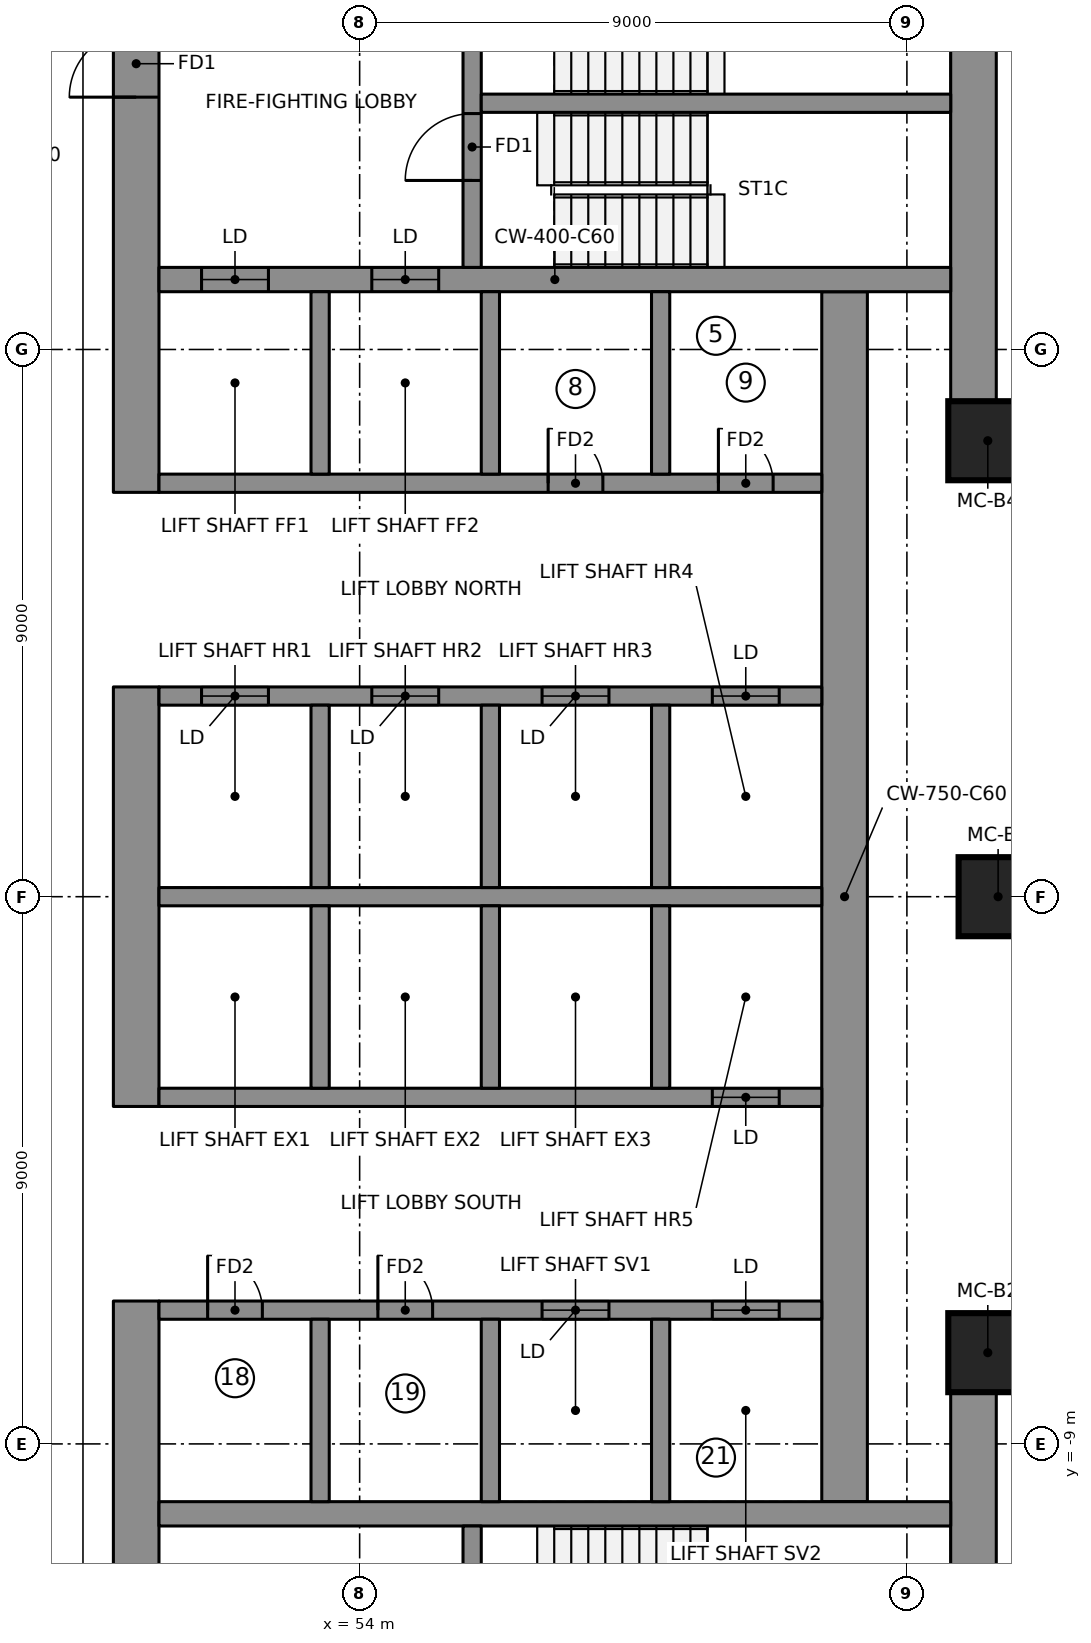
"""IFC4 building model, lengths in metres.
Left out: names, types, materials, properties, quantities, classifications, styles, units other than length and angle.
Written with IfcOpenShell. Run it as: python <this file> out.ifc"""

import sys

from ifc_helpers import new_model, si_unit, direction, frame, frame_2d, origin, origin_2d, place, context, subcontext, project, spatial, rectangle, extrude, element, fill, save


model = new_model("IFC4")
c1 = context("Model", 3, precision=1e-05, world=origin(), true_north=direction((0.0, 1.0)))
c2 = subcontext(c1, "Body", "Model", "MODEL_VIEW")
j1 = project(units=[si_unit("LENGTHUNIT", "METRE"), si_unit("PLANEANGLEUNIT", "RADIAN")], contexts=[c1])
p1 = place(None, origin())
s1 = spatial("IfcSite", under=j1, at=p1, CompositionType="ELEMENT")
p2 = place(p1, origin())
s2 = spatial("IfcBuilding", under=s1, at=p2, CompositionType="ELEMENT")
p3 = place(p2, frame((0.0, 0.0, 193.25)))
s3 = spatial("IfcBuildingStorey", under=s2, at=p3, CompositionType="ELEMENT", Elevation=193.25)
p4 = place(p3, frame((50.325, 6.65, 0.0), z_axis=(0.0, 0.0, 1.0), x_axis=(0.0, 1.0, 0.0)))
e1 = element("IfcWall", 1, at=p4, inside=s3, PredefinedType="SHEAR", context=c2, shape_type="SweptSolid", body=[
    extrude(rectangle(XDim=9.85, YDim=0.75, at=frame_2d((4.925, 0.0))), origin(), (0.0, 0.0, 1.0), 3.55),
])
p5 = place(p4, frame((6.5, 0.0, 0.0)))
e2 = element("IfcOpeningElement", 2, at=p5, cuts=e1, PredefinedType="OPENING", context=c2, shape_type="SweptSolid", body=[
    extrude(rectangle(XDim=1.1, YDim=2.1, at=frame_2d((0.55, 1.05))), frame((0.0, 0.385, 0.0), z_axis=(0.0, -1.0, 0.0), x_axis=(1.0, 0.0, 0.0)), (0.0, 0.0, 1.0), 0.77),
])
p6 = place(p3, frame((50.325, -3.45, 0.0), z_axis=(0.0, 0.0, 1.0), x_axis=(0.0, 1.0, 0.0)))
e3 = element("IfcWall", 3, at=p6, inside=s3, PredefinedType="SHEAR", context=c2, shape_type="SweptSolid", body=[
    extrude(rectangle(XDim=6.9, YDim=0.75, at=frame_2d((3.45, 0.0))), origin(), (0.0, 0.0, 1.0), 3.55),
])
p7 = place(p3, frame((50.325, -16.5, 0.0), z_axis=(0.0, 0.0, 1.0), x_axis=(0.0, 1.0, 0.0)))
e4 = element("IfcWall", 4, at=p7, inside=s3, PredefinedType="SHEAR", context=c2, shape_type="SweptSolid", body=[
    extrude(rectangle(XDim=9.85, YDim=0.75, at=frame_2d((4.925, 0.0))), origin(), (0.0, 0.0, 1.0), 3.55),
])
p8 = place(p7, frame((2.25, 0.0, 0.0)))
e5 = element("IfcOpeningElement", 5, at=p8, cuts=e4, PredefinedType="OPENING", context=c2, shape_type="SweptSolid", body=[
    extrude(rectangle(XDim=1.1, YDim=2.1, at=frame_2d((0.55, 1.05))), frame((0.0, 0.385, 0.0), z_axis=(0.0, -1.0, 0.0), x_axis=(1.0, 0.0, 0.0)), (0.0, 0.0, 1.0), 0.77),
])
for number, where, z_axis, x_axis in (
    (6, (64.095, 8.099, 0.0), (0.0, 0.0, 1.0), (0.0, 1.0, 0.0)),
    (7, (64.095, -15.75, 0.0), (0.0, 0.0, 1.0), (0.0, 1.0, 0.0)),
):
    element("IfcWall", number, at=place(p3, frame(where, z_axis=z_axis, x_axis=x_axis)), inside=s3, PredefinedType="SHEAR", context=c2, shape_type="SweptSolid", body=[
        extrude(rectangle(XDim=7.651, YDim=0.75, at=frame_2d((3.825, 0.0))), origin(), (0.0, 0.0, 1.0), 3.55),
    ])
p9 = place(p3, frame((61.975, -9.95, 0.0), z_axis=(0.0, 0.0, 1.0), x_axis=(0.0, 1.0, 0.0)))
e8 = element("IfcWall", 8, at=p9, inside=s3, PredefinedType="SHEAR", context=c2, shape_type="SweptSolid", body=[
    extrude(rectangle(XDim=19.9, YDim=0.75, at=frame_2d((9.95, 0.0))), origin(), (0.0, 0.0, 1.0), 3.55),
])
p10 = place(p3, frame((50.7, 10.15, 0.0), z_axis=(0.0, 0.0, 1.0), x_axis=(1.0, 0.0, 0.0)))
e9 = element("IfcWall", 9, at=p10, inside=s3, PredefinedType="SHEAR", context=c2, shape_type="SweptSolid", body=[
    extrude(rectangle(XDim=13.02, YDim=0.4, at=frame_2d((6.51, 0.0))), origin(), (0.0, 0.0, 1.0), 3.55),
])
p11 = place(p10, frame((0.7, 0.0, 0.0)))
e10 = element("IfcOpeningElement", 10, at=p11, cuts=e9, PredefinedType="OPENING", context=c2, shape_type="SweptSolid", body=[
    extrude(rectangle(XDim=1.1, YDim=2.1, at=frame_2d((0.55, 1.05))), frame((0.0, 0.21, 0.0), z_axis=(0.0, -1.0, 0.0), x_axis=(1.0, 0.0, 0.0)), (0.0, 0.0, 1.0), 0.42),
])
p12 = place(p10, frame((3.5, 0.0, 0.0)))
e11 = element("IfcOpeningElement", 11, at=p12, cuts=e9, PredefinedType="OPENING", context=c2, shape_type="SweptSolid", body=[
    extrude(rectangle(XDim=1.1, YDim=2.1, at=frame_2d((0.55, 1.05))), frame((0.0, 0.21, 0.0), z_axis=(0.0, -1.0, 0.0), x_axis=(1.0, 0.0, 0.0)), (0.0, 0.0, 1.0), 0.42),
])
p13 = place(p3, frame((50.7, -10.15, 0.0), z_axis=(0.0, 0.0, 1.0), x_axis=(1.0, 0.0, 0.0)))
e12 = element("IfcWall", 12, at=p13, inside=s3, PredefinedType="SHEAR", context=c2, shape_type="SweptSolid", body=[
    extrude(rectangle(XDim=13.02, YDim=0.4, at=frame_2d((6.51, 0.0))), origin(), (0.0, 0.0, 1.0), 3.55),
])
p14 = place(p3, frame((50.7, 0.0, 0.0), z_axis=(0.0, 0.0, 1.0), x_axis=(1.0, 0.0, 0.0)))
e13 = element("IfcWall", 13, at=p14, inside=s3, PredefinedType="SHEAR", context=c2, shape_type="SweptSolid", body=[
    extrude(rectangle(XDim=10.9, YDim=0.3, at=frame_2d((5.45, 0.0))), origin(), (0.0, 0.0, 1.0), 3.55),
])
p15 = place(p3, frame((50.7, 3.3, 0.0), z_axis=(0.0, 0.0, 1.0), x_axis=(1.0, 0.0, 0.0)))
e14 = element("IfcWall", 14, at=p15, inside=s3, PredefinedType="SHEAR", context=c2, shape_type="SweptSolid", body=[
    extrude(rectangle(XDim=10.9, YDim=0.3, at=frame_2d((5.45, 0.0))), origin(), (0.0, 0.0, 1.0), 3.55),
])
p16 = place(p15, frame((0.7, 0.0, 0.0)))
e15 = element("IfcOpeningElement", 15, at=p16, cuts=e14, PredefinedType="OPENING", context=c2, shape_type="SweptSolid", body=[
    extrude(rectangle(XDim=1.1, YDim=2.1, at=frame_2d((0.55, 1.05))), frame((0.0, 0.16, 0.0), z_axis=(0.0, -1.0, 0.0), x_axis=(1.0, 0.0, 0.0)), (0.0, 0.0, 1.0), 0.32),
])
p17 = place(p15, frame((3.5, 0.0, 0.0)))
e16 = element("IfcOpeningElement", 16, at=p17, cuts=e14, PredefinedType="OPENING", context=c2, shape_type="SweptSolid", body=[
    extrude(rectangle(XDim=1.1, YDim=2.1, at=frame_2d((0.55, 1.05))), frame((0.0, 0.16, 0.0), z_axis=(0.0, -1.0, 0.0), x_axis=(1.0, 0.0, 0.0)), (0.0, 0.0, 1.0), 0.32),
])
p18 = place(p15, frame((6.3, 0.0, 0.0)))
e17 = element("IfcOpeningElement", 17, at=p18, cuts=e14, PredefinedType="OPENING", context=c2, shape_type="SweptSolid", body=[
    extrude(rectangle(XDim=1.1, YDim=2.1, at=frame_2d((0.55, 1.05))), frame((0.0, 0.16, 0.0), z_axis=(0.0, -1.0, 0.0), x_axis=(1.0, 0.0, 0.0)), (0.0, 0.0, 1.0), 0.32),
])
p19 = place(p15, frame((9.1, 0.0, 0.0)))
e18 = element("IfcOpeningElement", 18, at=p19, cuts=e14, PredefinedType="OPENING", context=c2, shape_type="SweptSolid", body=[
    extrude(rectangle(XDim=1.1, YDim=2.1, at=frame_2d((0.55, 1.05))), frame((0.0, 0.16, 0.0), z_axis=(0.0, -1.0, 0.0), x_axis=(1.0, 0.0, 0.0)), (0.0, 0.0, 1.0), 0.32),
])
p20 = place(p3, frame((50.7, 6.8, 0.0), z_axis=(0.0, 0.0, 1.0), x_axis=(1.0, 0.0, 0.0)))
e19 = element("IfcWall", 19, at=p20, inside=s3, PredefinedType="SHEAR", context=c2, shape_type="SweptSolid", body=[
    extrude(rectangle(XDim=10.9, YDim=0.3, at=frame_2d((5.45, 0.0))), origin(), (0.0, 0.0, 1.0), 3.55),
])
p21 = place(p20, frame((6.4, 0.0, 0.0)))
e20 = element("IfcOpeningElement", 20, at=p21, cuts=e19, PredefinedType="OPENING", context=c2, shape_type="SweptSolid", body=[
    extrude(rectangle(XDim=0.9, YDim=2.1, at=frame_2d((0.45, 1.05))), frame((0.0, 0.16, 0.0), z_axis=(0.0, -1.0, 0.0), x_axis=(1.0, 0.0, 0.0)), (0.0, 0.0, 1.0), 0.32),
])
p22 = place(p20, frame((9.2, 0.0, 0.0)))
e21 = element("IfcOpeningElement", 21, at=p22, cuts=e19, PredefinedType="OPENING", context=c2, shape_type="SweptSolid", body=[
    extrude(rectangle(XDim=0.9, YDim=2.1, at=frame_2d((0.45, 1.05))), frame((0.0, 0.16, 0.0), z_axis=(0.0, -1.0, 0.0), x_axis=(1.0, 0.0, 0.0)), (0.0, 0.0, 1.0), 0.32),
])
for number, where, z_axis, x_axis in (
    (22, (53.35, 0.15, 0.0), (0.0, 0.0, 1.0), (0.0, 1.0, 0.0)),
    (23, (53.35, 6.95, 0.0), (0.0, 0.0, 1.0), (0.0, 1.0, 0.0)),
    (24, (56.15, 0.15, 0.0), (0.0, 0.0, 1.0), (0.0, 1.0, 0.0)),
    (25, (56.15, 6.95, 0.0), (0.0, 0.0, 1.0), (0.0, 1.0, 0.0)),
    (26, (58.95, 0.15, 0.0), (0.0, 0.0, 1.0), (0.0, 1.0, 0.0)),
    (27, (58.95, 6.95, 0.0), (0.0, 0.0, 1.0), (0.0, 1.0, 0.0)),
):
    element("IfcWall", number, at=place(p3, frame(where, z_axis=z_axis, x_axis=x_axis)), inside=s3, PredefinedType="SHEAR", context=c2, shape_type="SweptSolid", body=[
        extrude(rectangle(XDim=3.0, YDim=0.3, at=frame_2d((1.5, 0.0))), origin(), (0.0, 0.0, 1.0), 3.55),
    ])
p23 = place(p3, frame((50.7, -3.3, 0.0), z_axis=(0.0, 0.0, 1.0), x_axis=(1.0, 0.0, 0.0)))
e28 = element("IfcWall", 28, at=p23, inside=s3, PredefinedType="SHEAR", context=c2, shape_type="SweptSolid", body=[
    extrude(rectangle(XDim=10.9, YDim=0.3, at=frame_2d((5.45, 0.0))), origin(), (0.0, 0.0, 1.0), 3.55),
])
p24 = place(p23, frame((9.1, 0.0, 0.0)))
e29 = element("IfcOpeningElement", 29, at=p24, cuts=e28, PredefinedType="OPENING", context=c2, shape_type="SweptSolid", body=[
    extrude(rectangle(XDim=1.1, YDim=2.1, at=frame_2d((0.55, 1.05))), frame((0.0, 0.16, 0.0), z_axis=(0.0, -1.0, 0.0), x_axis=(1.0, 0.0, 0.0)), (0.0, 0.0, 1.0), 0.32),
])
p25 = place(p3, frame((50.7, -6.8, 0.0), z_axis=(0.0, 0.0, 1.0), x_axis=(1.0, 0.0, 0.0)))
e30 = element("IfcWall", 30, at=p25, inside=s3, PredefinedType="SHEAR", context=c2, shape_type="SweptSolid", body=[
    extrude(rectangle(XDim=10.9, YDim=0.3, at=frame_2d((5.45, 0.0))), origin(), (0.0, 0.0, 1.0), 3.55),
])
p26 = place(p25, frame((6.3, 0.0, 0.0)))
e31 = element("IfcOpeningElement", 31, at=p26, cuts=e30, PredefinedType="OPENING", context=c2, shape_type="SweptSolid", body=[
    extrude(rectangle(XDim=1.1, YDim=2.1, at=frame_2d((0.55, 1.05))), frame((0.0, 0.16, 0.0), z_axis=(0.0, -1.0, 0.0), x_axis=(1.0, 0.0, 0.0)), (0.0, 0.0, 1.0), 0.32),
])
p27 = place(p25, frame((9.1, 0.0, 0.0)))
e32 = element("IfcOpeningElement", 32, at=p27, cuts=e30, PredefinedType="OPENING", context=c2, shape_type="SweptSolid", body=[
    extrude(rectangle(XDim=1.1, YDim=2.1, at=frame_2d((0.55, 1.05))), frame((0.0, 0.16, 0.0), z_axis=(0.0, -1.0, 0.0), x_axis=(1.0, 0.0, 0.0)), (0.0, 0.0, 1.0), 0.32),
])
p28 = place(p25, frame((0.8, 0.0, 0.0)))
e33 = element("IfcOpeningElement", 33, at=p28, cuts=e30, PredefinedType="OPENING", context=c2, shape_type="SweptSolid", body=[
    extrude(rectangle(XDim=0.9, YDim=2.1, at=frame_2d((0.45, 1.05))), frame((0.0, 0.16, 0.0), z_axis=(0.0, -1.0, 0.0), x_axis=(1.0, 0.0, 0.0)), (0.0, 0.0, 1.0), 0.32),
])
p29 = place(p25, frame((3.6, 0.0, 0.0)))
e34 = element("IfcOpeningElement", 34, at=p29, cuts=e30, PredefinedType="OPENING", context=c2, shape_type="SweptSolid", body=[
    extrude(rectangle(XDim=0.9, YDim=2.1, at=frame_2d((0.45, 1.05))), frame((0.0, 0.16, 0.0), z_axis=(0.0, -1.0, 0.0), x_axis=(1.0, 0.0, 0.0)), (0.0, 0.0, 1.0), 0.32),
])
for number, where, z_axis, x_axis in (
    (35, (53.35, -3.15, 0.0), (0.0, 0.0, 1.0), (0.0, 1.0, 0.0)),
    (36, (53.35, -9.95, 0.0), (0.0, 0.0, 1.0), (0.0, 1.0, 0.0)),
    (37, (56.15, -3.15, 0.0), (0.0, 0.0, 1.0), (0.0, 1.0, 0.0)),
    (38, (56.15, -9.95, 0.0), (0.0, 0.0, 1.0), (0.0, 1.0, 0.0)),
    (39, (58.95, -3.15, 0.0), (0.0, 0.0, 1.0), (0.0, 1.0, 0.0)),
    (40, (58.95, -9.95, 0.0), (0.0, 0.0, 1.0), (0.0, 1.0, 0.0)),
):
    element("IfcWall", number, at=place(p3, frame(where, z_axis=z_axis, x_axis=x_axis)), inside=s3, PredefinedType="SHEAR", context=c2, shape_type="SweptSolid", body=[
        extrude(rectangle(XDim=3.0, YDim=0.3, at=frame_2d((1.5, 0.0))), origin(), (0.0, 0.0, 1.0), 3.55),
    ])
p30 = place(p3, frame((55.85, 10.35, 0.0), z_axis=(0.0, 0.0, 1.0), x_axis=(0.0, 1.0, 0.0)))
e41 = element("IfcWall", 41, at=p30, inside=s3, PredefinedType="SHEAR", context=c2, shape_type="SweptSolid", body=[
    extrude(rectangle(XDim=5.4, YDim=0.3, at=frame_2d((2.7, 0.0))), origin(), (0.0, 0.0, 1.0), 3.55),
])
p31 = place(p30, frame((1.43, 0.0, 0.0)))
e42 = element("IfcOpeningElement", 42, at=p31, cuts=e41, PredefinedType="OPENING", context=c2, shape_type="SweptSolid", body=[
    extrude(rectangle(XDim=1.1, YDim=2.1, at=frame_2d((0.55, 1.05))), frame((0.0, 0.16, 0.0), z_axis=(0.0, -1.0, 0.0), x_axis=(1.0, 0.0, 0.0)), (0.0, 0.0, 1.0), 0.32),
])
p32 = place(p30, frame((3.6, 0.0, 0.0)))
e43 = element("IfcOpeningElement", 43, at=p32, cuts=e41, PredefinedType="OPENING", context=c2, shape_type="SweptSolid", body=[
    extrude(rectangle(XDim=1.1, YDim=2.1, at=frame_2d((0.55, 1.05))), frame((0.0, 0.16, 0.0), z_axis=(0.0, -1.0, 0.0), x_axis=(1.0, 0.0, 0.0)), (0.0, 0.0, 1.0), 0.32),
])
p33 = place(p3, frame((55.85, -15.75, 0.0), z_axis=(0.0, 0.0, 1.0), x_axis=(0.0, 1.0, 0.0)))
e44 = element("IfcWall", 44, at=p33, inside=s3, PredefinedType="SHEAR", context=c2, shape_type="SweptSolid", body=[
    extrude(rectangle(XDim=5.4, YDim=0.3, at=frame_2d((2.7, 0.0))), origin(), (0.0, 0.0, 1.0), 3.55),
])
p34 = place(p33, frame((3.6, 0.0, 0.0)))
e45 = element("IfcOpeningElement", 45, at=p34, cuts=e44, PredefinedType="OPENING", context=c2, shape_type="SweptSolid", body=[
    extrude(rectangle(XDim=1.1, YDim=2.1, at=frame_2d((0.55, 1.05))), frame((0.0, 0.16, 0.0), z_axis=(0.0, -1.0, 0.0), x_axis=(1.0, 0.0, 0.0)), (0.0, 0.0, 1.0), 0.32),
])
p35 = place(p33, frame((0.8, 0.0, 0.0)))
e46 = element("IfcOpeningElement", 46, at=p35, cuts=e44, PredefinedType="OPENING", context=c2, shape_type="SweptSolid", body=[
    extrude(rectangle(XDim=0.9, YDim=2.1, at=frame_2d((0.45, 1.05))), frame((0.0, 0.16, 0.0), z_axis=(0.0, -1.0, 0.0), x_axis=(1.0, 0.0, 0.0)), (0.0, 0.0, 1.0), 0.32),
])
p36 = place(p3, frame((56.0, 13.05, 0.0), z_axis=(0.0, 0.0, 1.0), x_axis=(1.0, 0.0, 0.0)))
e47 = element("IfcWall", 47, at=p36, inside=s3, PredefinedType="SHEAR", context=c2, shape_type="SweptSolid", body=[
    extrude(rectangle(XDim=7.72, YDim=0.3, at=frame_2d((3.86, 0.0))), origin(), (0.0, 0.0, 1.0), 3.55),
])
for number, where, z_axis, x_axis in (
    (48, (64.33, -7.499, 0.0), (0.0, 0.0, 1.0), (1.0, 0.0, 0.0)),
    (49, (64.5, 0.0, 0.0), (0.0, 0.0, 1.0), (1.0, 0.0, 0.0)),
    (50, (64.33, 7.499, 0.0), (0.0, 0.0, 1.0), (1.0, 0.0, 0.0)),
):
    element("IfcColumn", number, at=place(p3, frame(where, z_axis=z_axis, x_axis=x_axis)), inside=s3, PredefinedType="COLUMN", context=c2, shape_type="SweptSolid", body=[
        extrude(rectangle(XDim=1.3, YDim=1.3, at=origin_2d()), origin(), (0.0, 0.0, 1.0), 3.55),
    ])
p37 = place(p11, origin())
e51 = element("IfcDoor", 51, at=p37, inside=s3, OperationType="DOUBLE_DOOR_SLIDING", PredefinedType="DOOR", context=c2, shape_type="SweptSolid", body=[
    extrude(rectangle(XDim=1.1, YDim=2.1, at=frame_2d((0.55, 1.05))), frame((0.0, 0.025, 0.0), z_axis=(0.0, -1.0, 0.0), x_axis=(1.0, 0.0, 0.0)), (0.0, 0.0, 1.0), 0.05),
])
fill(e10, e51)
p38 = place(p12, origin())
e52 = element("IfcDoor", 52, at=p38, inside=s3, OperationType="DOUBLE_DOOR_SLIDING", PredefinedType="DOOR", context=c2, shape_type="SweptSolid", body=[
    extrude(rectangle(XDim=1.1, YDim=2.1, at=frame_2d((0.55, 1.05))), frame((0.0, 0.025, 0.0), z_axis=(0.0, -1.0, 0.0), x_axis=(1.0, 0.0, 0.0)), (0.0, 0.0, 1.0), 0.05),
])
fill(e11, e52)
p39 = place(p16, origin())
e53 = element("IfcDoor", 53, at=p39, inside=s3, OperationType="DOUBLE_DOOR_SLIDING", PredefinedType="DOOR", context=c2, shape_type="SweptSolid", body=[
    extrude(rectangle(XDim=1.1, YDim=2.1, at=frame_2d((0.55, 1.05))), frame((0.0, 0.025, 0.0), z_axis=(0.0, -1.0, 0.0), x_axis=(1.0, 0.0, 0.0)), (0.0, 0.0, 1.0), 0.05),
])
fill(e15, e53)
p40 = place(p17, origin())
e54 = element("IfcDoor", 54, at=p40, inside=s3, OperationType="DOUBLE_DOOR_SLIDING", PredefinedType="DOOR", context=c2, shape_type="SweptSolid", body=[
    extrude(rectangle(XDim=1.1, YDim=2.1, at=frame_2d((0.55, 1.05))), frame((0.0, 0.025, 0.0), z_axis=(0.0, -1.0, 0.0), x_axis=(1.0, 0.0, 0.0)), (0.0, 0.0, 1.0), 0.05),
])
fill(e16, e54)
p41 = place(p18, origin())
e55 = element("IfcDoor", 55, at=p41, inside=s3, OperationType="DOUBLE_DOOR_SLIDING", PredefinedType="DOOR", context=c2, shape_type="SweptSolid", body=[
    extrude(rectangle(XDim=1.1, YDim=2.1, at=frame_2d((0.55, 1.05))), frame((0.0, 0.025, 0.0), z_axis=(0.0, -1.0, 0.0), x_axis=(1.0, 0.0, 0.0)), (0.0, 0.0, 1.0), 0.05),
])
fill(e17, e55)
p42 = place(p19, origin())
e56 = element("IfcDoor", 56, at=p42, inside=s3, OperationType="DOUBLE_DOOR_SLIDING", PredefinedType="DOOR", context=c2, shape_type="SweptSolid", body=[
    extrude(rectangle(XDim=1.1, YDim=2.1, at=frame_2d((0.55, 1.05))), frame((0.0, 0.025, 0.0), z_axis=(0.0, -1.0, 0.0), x_axis=(1.0, 0.0, 0.0)), (0.0, 0.0, 1.0), 0.05),
])
fill(e18, e56)
p43 = place(p24, origin())
e57 = element("IfcDoor", 57, at=p43, inside=s3, OperationType="DOUBLE_DOOR_SLIDING", PredefinedType="DOOR", context=c2, shape_type="SweptSolid", body=[
    extrude(rectangle(XDim=1.1, YDim=2.1, at=frame_2d((0.55, 1.05))), frame((0.0, 0.025, 0.0), z_axis=(0.0, -1.0, 0.0), x_axis=(1.0, 0.0, 0.0)), (0.0, 0.0, 1.0), 0.05),
])
fill(e29, e57)
p44 = place(p26, origin())
e58 = element("IfcDoor", 58, at=p44, inside=s3, OperationType="DOUBLE_DOOR_SLIDING", PredefinedType="DOOR", context=c2, shape_type="SweptSolid", body=[
    extrude(rectangle(XDim=1.1, YDim=2.1, at=frame_2d((0.55, 1.05))), frame((0.0, 0.025, 0.0), z_axis=(0.0, -1.0, 0.0), x_axis=(1.0, 0.0, 0.0)), (0.0, 0.0, 1.0), 0.05),
])
fill(e31, e58)
p45 = place(p27, origin())
e59 = element("IfcDoor", 59, at=p45, inside=s3, OperationType="DOUBLE_DOOR_SLIDING", PredefinedType="DOOR", context=c2, shape_type="SweptSolid", body=[
    extrude(rectangle(XDim=1.1, YDim=2.1, at=frame_2d((0.55, 1.05))), frame((0.0, 0.025, 0.0), z_axis=(0.0, -1.0, 0.0), x_axis=(1.0, 0.0, 0.0)), (0.0, 0.0, 1.0), 0.05),
])
fill(e32, e59)
p46 = place(p31, origin())
e60 = element("IfcDoor", 60, at=p46, inside=s3, OperationType="SINGLE_SWING_RIGHT", PredefinedType="DOOR", context=c2, shape_type="SweptSolid", body=[
    extrude(rectangle(XDim=1.1, YDim=2.1, at=frame_2d((0.55, 1.05))), frame((0.0, 0.025, 0.0), z_axis=(0.0, -1.0, 0.0), x_axis=(1.0, 0.0, 0.0)), (0.0, 0.0, 1.0), 0.05),
])
fill(e42, e60)
p47 = place(p5, origin())
e61 = element("IfcDoor", 61, at=p47, inside=s3, OperationType="SINGLE_SWING_RIGHT", PredefinedType="DOOR", context=c2, shape_type="SweptSolid", body=[
    extrude(rectangle(XDim=1.1, YDim=2.1, at=frame_2d((0.55, 1.05))), frame((0.0, 0.025, 0.0), z_axis=(0.0, -1.0, 0.0), x_axis=(1.0, 0.0, 0.0)), (0.0, 0.0, 1.0), 0.05),
])
fill(e2, e61)
p48 = place(p21, origin())
e62 = element("IfcDoor", 62, at=p48, inside=s3, OperationType="SINGLE_SWING_LEFT", PredefinedType="DOOR", context=c2, shape_type="SweptSolid", body=[
    extrude(rectangle(XDim=0.9, YDim=2.1, at=frame_2d((0.45, 1.05))), frame((0.0, 0.025, 0.0), z_axis=(0.0, -1.0, 0.0), x_axis=(1.0, 0.0, 0.0)), (0.0, 0.0, 1.0), 0.05),
])
fill(e20, e62)
p49 = place(p22, origin())
e63 = element("IfcDoor", 63, at=p49, inside=s3, OperationType="SINGLE_SWING_LEFT", PredefinedType="DOOR", context=c2, shape_type="SweptSolid", body=[
    extrude(rectangle(XDim=0.9, YDim=2.1, at=frame_2d((0.45, 1.05))), frame((0.0, 0.025, 0.0), z_axis=(0.0, -1.0, 0.0), x_axis=(1.0, 0.0, 0.0)), (0.0, 0.0, 1.0), 0.05),
])
fill(e21, e63)
p50 = place(p28, origin())
e64 = element("IfcDoor", 64, at=p50, inside=s3, OperationType="SINGLE_SWING_LEFT", PredefinedType="DOOR", context=c2, shape_type="SweptSolid", body=[
    extrude(rectangle(XDim=0.9, YDim=2.1, at=frame_2d((0.45, 1.05))), frame((0.0, 0.025, 0.0), z_axis=(0.0, -1.0, 0.0), x_axis=(1.0, 0.0, 0.0)), (0.0, 0.0, 1.0), 0.05),
])
fill(e33, e64)
p51 = place(p29, origin())
e65 = element("IfcDoor", 65, at=p51, inside=s3, OperationType="SINGLE_SWING_LEFT", PredefinedType="DOOR", context=c2, shape_type="SweptSolid", body=[
    extrude(rectangle(XDim=0.9, YDim=2.1, at=frame_2d((0.45, 1.05))), frame((0.0, 0.025, 0.0), z_axis=(0.0, -1.0, 0.0), x_axis=(1.0, 0.0, 0.0)), (0.0, 0.0, 1.0), 0.05),
])
fill(e34, e65)
save(model, sys.argv[1])
